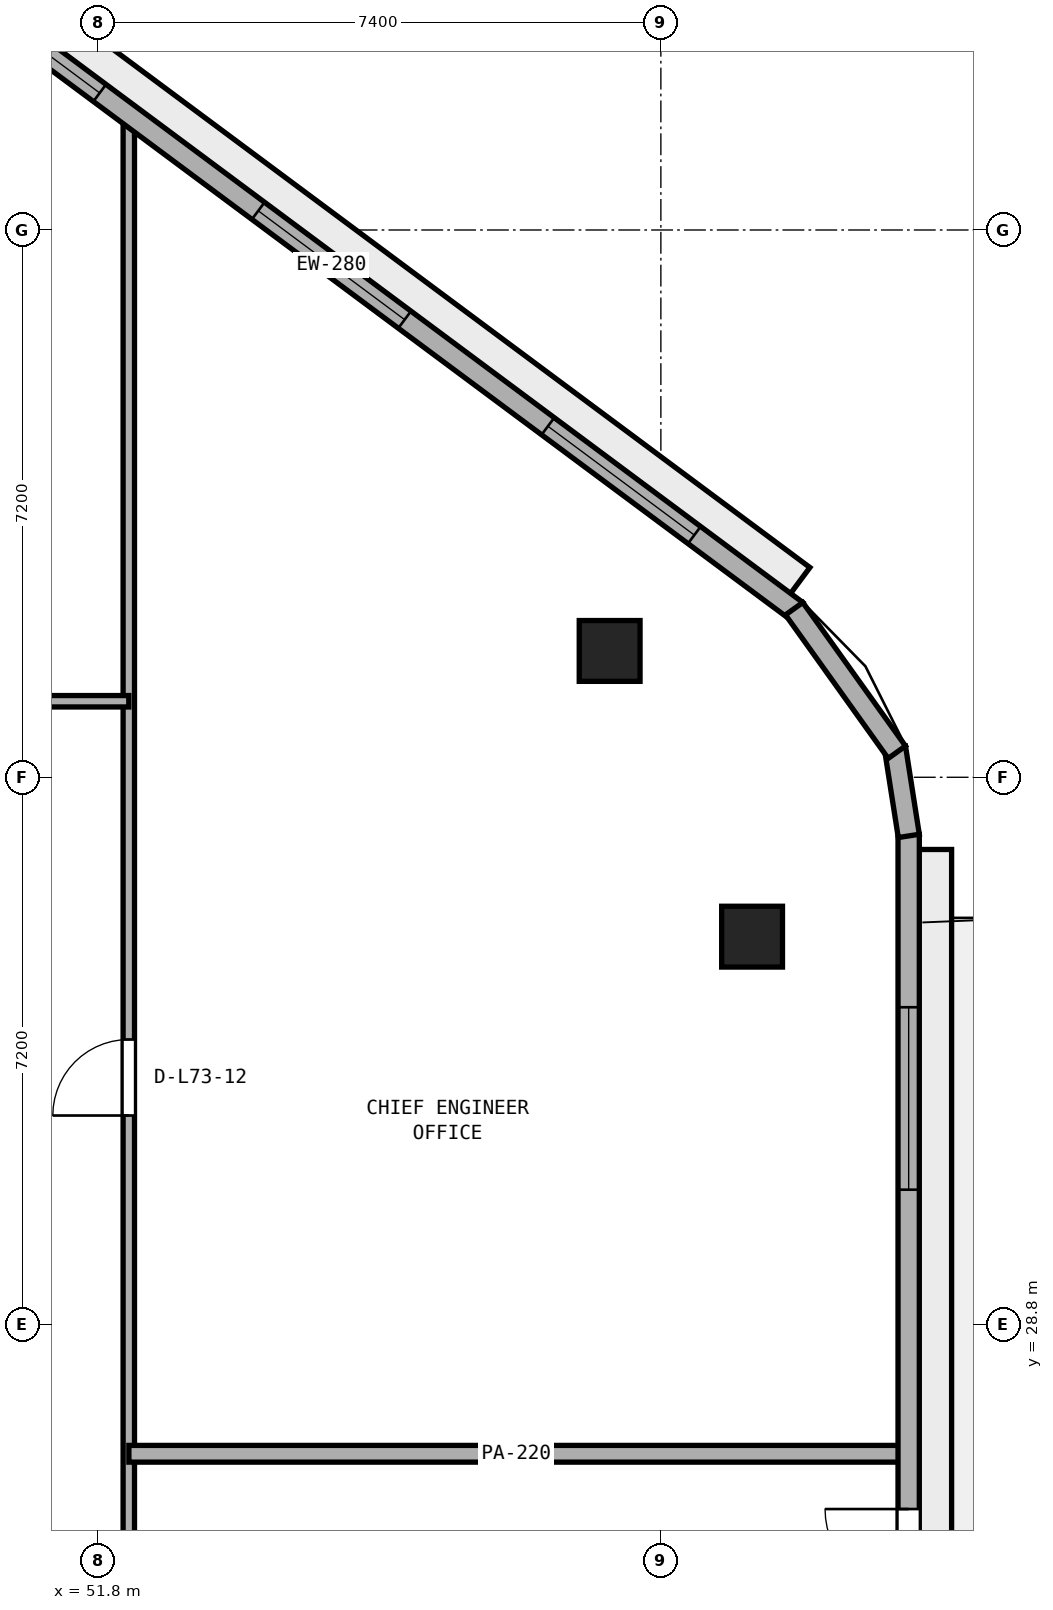
"""IFC4 building model, lengths in metres.
Left out: names, types, materials, properties, quantities, classifications, styles, units other than length and angle.
Written with IfcOpenShell. Run it as: python <this file> out.ifc"""

import sys

from ifc_helpers import new_model, si_unit, direction, frame, frame_2d, origin, origin_2d, place, context, subcontext, project, spatial, rectangle, extrude, element, fill, save


model = new_model("IFC4")
c1 = context("Model", 3, precision=1e-05, world=origin(), true_north=direction((0.0, 1.0)))
c2 = subcontext(c1, "Body", "Model", "MODEL_VIEW")
j1 = project(units=[si_unit("LENGTHUNIT", "METRE"), si_unit("PLANEANGLEUNIT", "RADIAN")], contexts=[c1])
p1 = place(None, origin())
s1 = spatial("IfcSite", under=j1, at=p1, CompositionType="ELEMENT")
p2 = place(p1, origin())
s2 = spatial("IfcBuilding", under=s1, at=p2, CompositionType="ELEMENT")
p3 = place(p2, frame((0.0, 0.0, 285.8)))
s3 = spatial("IfcBuildingStorey", under=s2, at=p3, CompositionType="ELEMENT", Elevation=285.8)
for number, where, z_axis, x_axis in (
    (1, (60.4, 33.903, 0.0), (0.0, 0.0, 1.0), (1.0, 0.0, 0.0)),
    (2, (58.526, 37.662, 0.0), (0.0, 0.0, 1.0), (1.0, 0.0, 0.0)),
):
    element("IfcColumn", number, at=place(p3, frame(where, z_axis=z_axis, x_axis=x_axis)), inside=s3, PredefinedType="COLUMN", context=c2, shape_type="SweptSolid", body=[
        extrude(rectangle(XDim=0.8, YDim=0.8, at=origin_2d()), origin(), (0.0, 0.0, 1.0), 3.8),
    ])
p4 = place(p3, frame((52.2, 22.6, 0.0), z_axis=(0.0, 0.0, 1.0), x_axis=(0.0, 1.0, 0.0)))
e3 = element("IfcWall", 3, at=p4, inside=s3, PredefinedType="PARTITIONING", context=c2, shape_type="SweptSolid", body=[
    extrude(rectangle(XDim=22.153, YDim=0.15, at=frame_2d((11.076, 0.0))), origin(), (0.0, 0.0, 1.0), 3.54),
])
p5 = place(p4, frame((1.87, 0.0, 0.0)))
e4 = element("IfcOpeningElement", 4, at=p5, cuts=e3, PredefinedType="OPENING", context=c2, shape_type="SweptSolid", body=[
    extrude(rectangle(XDim=1.0, YDim=2.12, at=frame_2d((0.5, 1.06))), frame((0.0, 0.085, 0.0), z_axis=(0.0, -1.0, 0.0), x_axis=(1.0, 0.0, 0.0)), (0.0, 0.0, 1.0), 0.17),
])
p6 = place(p4, frame((8.95, 0.0, 0.0)))
e5 = element("IfcOpeningElement", 5, at=p6, cuts=e3, PredefinedType="OPENING", context=c2, shape_type="SweptSolid", body=[
    extrude(rectangle(XDim=1.0, YDim=2.12, at=frame_2d((0.5, 1.06))), frame((0.0, 0.085, 0.0), z_axis=(0.0, -1.0, 0.0), x_axis=(1.0, 0.0, 0.0)), (0.0, 0.0, 1.0), 0.17),
])
p7 = place(p3, frame((52.201, 27.1, 0.0), z_axis=(0.0, 0.0, 1.0), x_axis=(1.0, 0.0, 0.0)))
e6 = element("IfcWall", 6, at=p7, inside=s3, PredefinedType="PARTITIONING", context=c2, shape_type="SweptSolid", body=[
    extrude(rectangle(XDim=10.194, YDim=0.22, at=frame_2d((5.097, 0.0))), origin(), (0.0, 0.0, 1.0), 3.54),
])
p8 = place(p3, frame((38.35, 37.0, 0.0), z_axis=(0.0, 0.0, 1.0), x_axis=(1.0, 0.0, 0.0)))
e7 = element("IfcWall", 7, at=p8, inside=s3, PredefinedType="PARTITIONING", context=c2, shape_type="SweptSolid", body=[
    extrude(rectangle(XDim=13.85, YDim=0.15, at=frame_2d((6.925, 0.0))), origin(), (0.0, 0.0, 1.0), 3.54),
])
p9 = place(p8, frame((10.28, 0.0, 0.0)))
e8 = element("IfcOpeningElement", 8, at=p9, cuts=e7, PredefinedType="OPENING", context=c2, shape_type="SweptSolid", body=[
    extrude(rectangle(XDim=1.0, YDim=2.12, at=frame_2d((0.5, 1.06))), frame((0.0, 0.085, 0.0), z_axis=(0.0, -1.0, 0.0), x_axis=(1.0, 0.0, 0.0)), (0.0, 0.0, 1.0), 0.17),
])
p10 = place(p3, frame((62.46, 16.396, 0.0), z_axis=(0.0, 0.0, 1.0), x_axis=(0.0, 1.0, 0.0)))
e9 = element("IfcWall", 9, at=p10, inside=s3, PredefinedType="STANDARD", context=c2, shape_type="SweptSolid", body=[
    extrude(rectangle(XDim=18.854, YDim=0.28, at=frame_2d((9.427, 0.0))), origin(), (0.0, 0.0, 1.0), 3.54),
])
p11 = place(p10, frame((8.877, 0.0, 0.0)))
e10 = element("IfcOpeningElement", 10, at=p11, cuts=e9, PredefinedType="OPENING", context=c2, shape_type="SweptSolid", body=[
    extrude(rectangle(XDim=1.1, YDim=2.2, at=frame_2d((0.55, 1.1))), frame((0.0, 0.15, 0.0), z_axis=(0.0, -1.0, 0.0), x_axis=(1.0, 0.0, 0.0)), (0.0, 0.0, 1.0), 0.3),
])
p12 = place(p10, frame((2.276, 0.0, 0.9)))
e11 = element("IfcOpeningElement", 11, at=p12, cuts=e9, PredefinedType="OPENING", context=c2, shape_type="SweptSolid", body=[
    extrude(rectangle(XDim=2.4, YDim=1.75, at=frame_2d((1.2, 0.875))), frame((0.0, 0.15, 0.0), z_axis=(0.0, -1.0, 0.0), x_axis=(1.0, 0.0, 0.0)), (0.0, 0.0, 1.0), 0.3),
])
p13 = place(p10, frame((14.179, 0.0, 0.9)))
e12 = element("IfcOpeningElement", 12, at=p13, cuts=e9, PredefinedType="OPENING", context=c2, shape_type="SweptSolid", body=[
    extrude(rectangle(XDim=2.4, YDim=1.75, at=frame_2d((1.2, 0.875))), frame((0.0, 0.15, 0.0), z_axis=(0.0, -1.0, 0.0), x_axis=(1.0, 0.0, 0.0)), (0.0, 0.0, 1.0), 0.3),
])
p14 = place(p3, frame((60.984, 38.187, 0.0), z_axis=(0.0, 0.0, 1.0), x_axis=(-0.802485144343, 0.596672098484, 0.0)))
e13 = element("IfcWall", 13, at=p14, inside=s3, PredefinedType="STANDARD", context=c2, shape_type="SweptSolid", body=[
    extrude(rectangle(XDim=15.248, YDim=0.28, at=frame_2d((7.624, 0.0))), origin(), (0.0, 0.0, 1.0), 3.54),
])
p15 = place(p14, frame((1.675, 0.0, 0.9)))
e14 = element("IfcOpeningElement", 14, at=p15, cuts=e13, PredefinedType="OPENING", context=c2, shape_type="SweptSolid", body=[
    extrude(rectangle(XDim=2.4, YDim=1.75, at=frame_2d((1.2, 0.875))), frame((0.0, 0.15, 0.0), z_axis=(0.0, -1.0, 0.0), x_axis=(1.0, 0.0, 0.0)), (0.0, 0.0, 1.0), 0.3),
])
p16 = place(p14, frame((6.424, 0.0, 0.9)))
e15 = element("IfcOpeningElement", 15, at=p16, cuts=e13, PredefinedType="OPENING", context=c2, shape_type="SweptSolid", body=[
    extrude(rectangle(XDim=2.4, YDim=1.75, at=frame_2d((1.2, 0.875))), frame((0.0, 0.15, 0.0), z_axis=(0.0, -1.0, 0.0), x_axis=(1.0, 0.0, 0.0)), (0.0, 0.0, 1.0), 0.3),
])
p17 = place(p14, frame((11.423, 0.0, 0.9)))
e16 = element("IfcOpeningElement", 16, at=p17, cuts=e13, PredefinedType="OPENING", context=c2, shape_type="SweptSolid", body=[
    extrude(rectangle(XDim=2.4, YDim=1.75, at=frame_2d((1.2, 0.875))), frame((0.0, 0.15, 0.0), z_axis=(0.0, -1.0, 0.0), x_axis=(1.0, 0.0, 0.0)), (0.0, 0.0, 1.0), 0.3),
])
p18 = place(p3, frame((62.462, 35.229, 0.0), z_axis=(0.0, 0.0, 1.0), x_axis=(-0.15458604025, 0.987979329824, 0.0)))
e17 = element("IfcWall", 17, at=p18, inside=s3, PredefinedType="STANDARD", context=c2, shape_type="SweptSolid", body=[
    extrude(rectangle(XDim=1.175, YDim=0.28, at=frame_2d((0.587, 0.0))), origin(), (0.0, 0.0, 1.0), 3.54),
])
p19 = place(p3, frame((62.304, 36.33, 0.0), z_axis=(0.0, 0.0, 1.0), x_axis=(-0.581795068472, 0.81333541562, 0.0)))
e18 = element("IfcWall", 18, at=p19, inside=s3, PredefinedType="STANDARD", context=c2, shape_type="SweptSolid", body=[
    extrude(rectangle(XDim=2.322, YDim=0.28, at=frame_2d((1.161, 0.0))), origin(), (0.0, 0.0, 1.0), 3.54),
])
p20 = place(p6, origin())
e19 = element("IfcDoor", 19, at=p20, inside=s3, OperationType="SINGLE_SWING_LEFT", PredefinedType="DOOR", context=c2, shape_type="SweptSolid", body=[
    extrude(rectangle(XDim=1.0, YDim=2.12, at=frame_2d((0.5, 1.06))), frame((0.0, 0.025, 0.0), z_axis=(0.0, -1.0, 0.0), x_axis=(1.0, 0.0, 0.0)), (0.0, 0.0, 1.0), 0.05),
])
fill(e5, e19)
p21 = place(p11, origin())
e20 = element("IfcDoor", 20, at=p21, inside=s3, OperationType="SINGLE_SWING_RIGHT", PredefinedType="DOOR", context=c2, shape_type="SweptSolid", body=[
    extrude(rectangle(XDim=1.1, YDim=2.2, at=frame_2d((0.55, 1.1))), frame((0.0, 0.025, 0.0), z_axis=(0.0, -1.0, 0.0), x_axis=(1.0, 0.0, 0.0)), (0.0, 0.0, 1.0), 0.05),
])
fill(e10, e20)
p22 = place(p13, origin())
e21 = element("IfcWindow", 21, at=p22, inside=s3, PartitioningType="SINGLE_PANEL", PredefinedType="WINDOW", context=c2, shape_type="SweptSolid", body=[
    extrude(rectangle(XDim=2.4, YDim=1.75, at=frame_2d((1.2, 0.875))), frame((0.0, 0.03, 0.0), z_axis=(0.0, -1.0, 0.0), x_axis=(1.0, 0.0, 0.0)), (0.0, 0.0, 1.0), 0.06),
])
fill(e12, e21)
p23 = place(p15, origin())
e22 = element("IfcWindow", 22, at=p23, inside=s3, PartitioningType="SINGLE_PANEL", PredefinedType="WINDOW", context=c2, shape_type="SweptSolid", body=[
    extrude(rectangle(XDim=2.4, YDim=1.75, at=frame_2d((1.2, 0.875))), frame((0.0, 0.03, 0.0), z_axis=(0.0, -1.0, 0.0), x_axis=(1.0, 0.0, 0.0)), (0.0, 0.0, 1.0), 0.06),
])
fill(e14, e22)
p24 = place(p16, origin())
e23 = element("IfcWindow", 23, at=p24, inside=s3, PartitioningType="SINGLE_PANEL", PredefinedType="WINDOW", context=c2, shape_type="SweptSolid", body=[
    extrude(rectangle(XDim=2.4, YDim=1.75, at=frame_2d((1.2, 0.875))), frame((0.0, 0.03, 0.0), z_axis=(0.0, -1.0, 0.0), x_axis=(1.0, 0.0, 0.0)), (0.0, 0.0, 1.0), 0.06),
])
fill(e15, e23)
p25 = place(p17, origin())
e24 = element("IfcWindow", 24, at=p25, inside=s3, PartitioningType="SINGLE_PANEL", PredefinedType="WINDOW", context=c2, shape_type="SweptSolid", body=[
    extrude(rectangle(XDim=2.4, YDim=1.75, at=frame_2d((1.2, 0.875))), frame((0.0, 0.03, 0.0), z_axis=(0.0, -1.0, 0.0), x_axis=(1.0, 0.0, 0.0)), (0.0, 0.0, 1.0), 0.06),
])
fill(e16, e24)
save(model, sys.argv[1])
